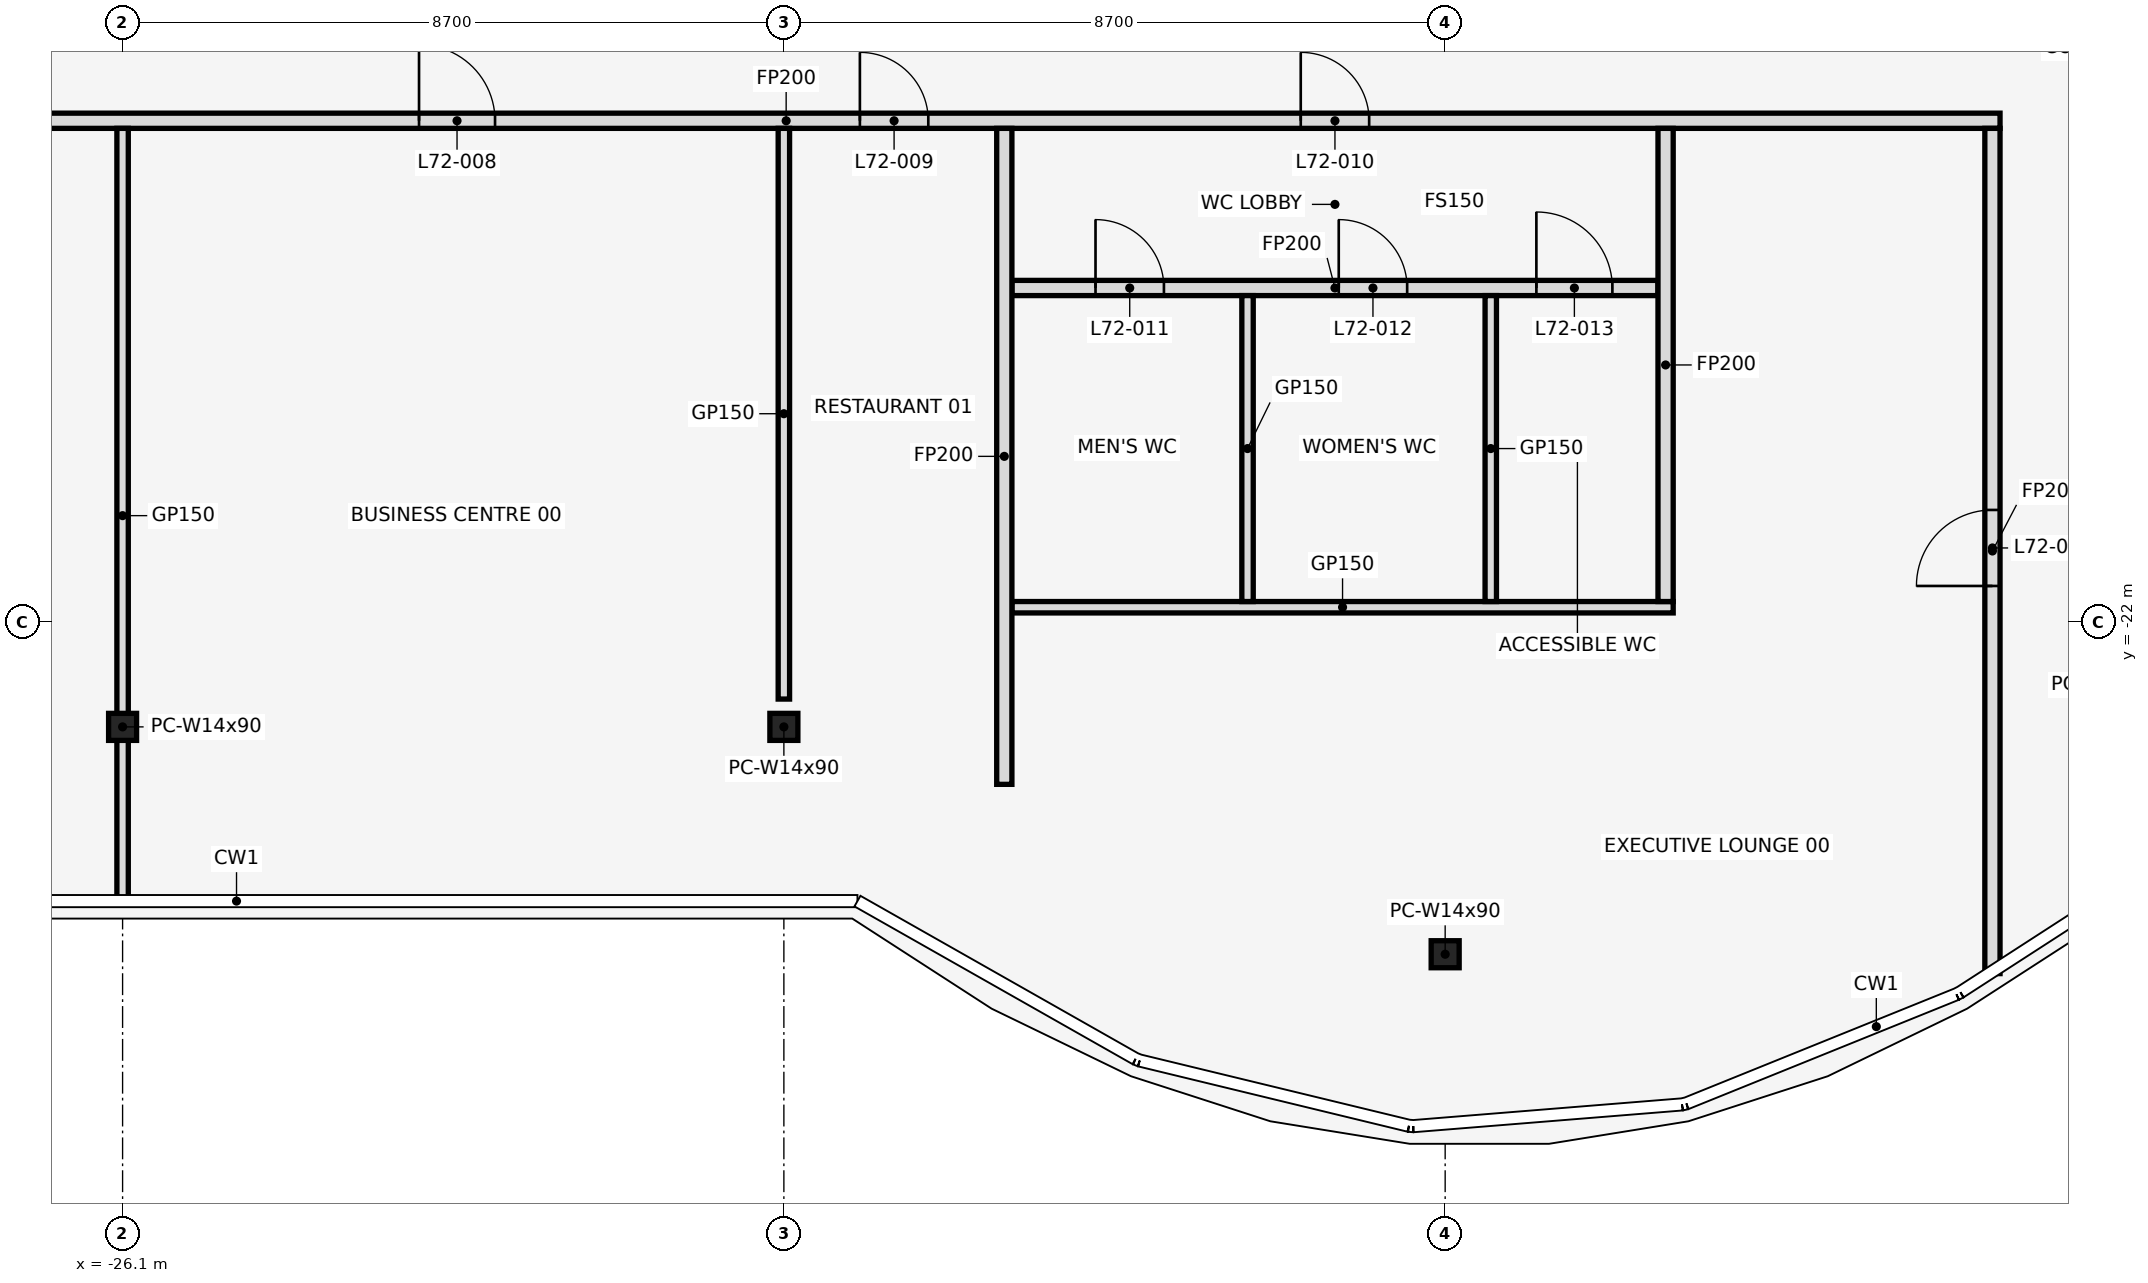
"""IFC4 building model, lengths in metres.
Left out: names, types, materials, properties, quantities, classifications, styles, units other than length and angle.
Written with IfcOpenShell. Run it as: python <this file> out.ifc"""

import sys

from ifc_helpers import new_model, si_unit, direction, frame, frame_2d, origin, origin_2d, place, context, subcontext, project, spatial, rectangle, i_section, extrude, element, fill, save


model = new_model("IFC4")
c1 = context("Model", 3, precision=1e-05, world=origin(), true_north=direction((0.0, 1.0)))
c2 = subcontext(c1, "Body", "Model", "MODEL_VIEW")
j1 = project(units=[si_unit("LENGTHUNIT", "METRE"), si_unit("PLANEANGLEUNIT", "RADIAN")], contexts=[c1])
p1 = place(None, origin())
s1 = spatial("IfcSite", under=j1, at=p1, CompositionType="ELEMENT")
p2 = place(p1, origin())
s2 = spatial("IfcBuilding", under=s1, at=p2, CompositionType="ELEMENT")
p3 = place(p2, frame((0.0, 0.0, 320.0)))
s3 = spatial("IfcBuildingStorey", under=s2, at=p3, CompositionType="ELEMENT", Elevation=320.0)
for number, where, z_axis, x_axis in (
    (1, (-26.1, -23.374, 0.0), (0.0, 0.0, 1.0), (1.0, 0.0, 0.0)),
    (2, (-17.4, -23.374, 0.0), (0.0, 0.0, 1.0), (1.0, 0.0, 0.0)),
    (3, (-8.7, -26.365, 0.0), (0.0, 0.0, 1.0), (1.0, 0.0, 0.0)),
):
    element("IfcColumn", number, at=place(p3, frame(where, z_axis=z_axis, x_axis=x_axis)), inside=s3, PredefinedType="COLUMN", context=c2, shape_type="SweptSolid", body=[
        extrude(i_section(OverallWidth=0.368, OverallDepth=0.356, WebThickness=0.011, FlangeThickness=0.018, at=origin_2d()), origin(), (0.0, 0.0, 1.0), 4.5),
    ])
p4 = place(p3, frame((-14.4, -21.8, 0.0), z_axis=(0.0, 0.0, 1.0), x_axis=(1.0, 0.0, 0.0)))
e4 = element("IfcWall", 4, at=p4, inside=s3, PredefinedType="PARTITIONING", context=c2, shape_type="SweptSolid", body=[
    extrude(rectangle(XDim=8.7, YDim=0.15, at=frame_2d((4.35, 0.0))), origin(), (0.0, 0.0, 1.0), 3.418),
])
p5 = place(p3, frame((-14.4, -17.6, 0.0), z_axis=(0.0, 0.0, 1.0), x_axis=(1.0, 0.0, 0.0)))
e5 = element("IfcWall", 5, at=p5, inside=s3, PredefinedType="PARTITIONING", context=c2, shape_type="SweptSolid", body=[
    extrude(rectangle(XDim=8.5, YDim=0.2, at=frame_2d((4.25, 0.0))), origin(), (0.0, 0.0, 1.0), 3.418),
])
p6 = place(p5, frame((1.1, 0.0, 0.0)))
e6 = element("IfcOpeningElement", 6, at=p6, cuts=e5, PredefinedType="OPENING", context=c2, shape_type="SweptSolid", body=[
    extrude(rectangle(XDim=0.9, YDim=2.1, at=frame_2d((0.45, 1.05))), frame((0.0, 0.112, 0.0), z_axis=(0.0, -1.0, 0.0), x_axis=(1.0, 0.0, 0.0)), (0.0, 0.0, 1.0), 0.224),
])
p7 = place(p5, frame((4.3, 0.0, 0.0)))
e7 = element("IfcOpeningElement", 7, at=p7, cuts=e5, PredefinedType="OPENING", context=c2, shape_type="SweptSolid", body=[
    extrude(rectangle(XDim=0.9, YDim=2.1, at=frame_2d((0.45, 1.05))), frame((0.0, 0.112, 0.0), z_axis=(0.0, -1.0, 0.0), x_axis=(1.0, 0.0, 0.0)), (0.0, 0.0, 1.0), 0.224),
])
p8 = place(p5, frame((6.9, 0.0, 0.0)))
e8 = element("IfcOpeningElement", 8, at=p8, cuts=e5, PredefinedType="OPENING", context=c2, shape_type="SweptSolid", body=[
    extrude(rectangle(XDim=1.0, YDim=2.1, at=frame_2d((0.5, 1.05))), frame((0.0, 0.112, 0.0), z_axis=(0.0, -1.0, 0.0), x_axis=(1.0, 0.0, 0.0)), (0.0, 0.0, 1.0), 0.224),
])
p9 = place(p3, frame((-33.34, -15.4, 0.0), z_axis=(0.0, 0.0, 1.0), x_axis=(1.0, 0.0, 0.0)))
e9 = element("IfcWall", 9, at=p9, inside=s3, PredefinedType="PARTITIONING", context=c2, shape_type="SweptSolid", body=[
    extrude(rectangle(XDim=31.94, YDim=0.2, at=frame_2d((15.97, 0.0))), origin(), (0.0, 0.0, 1.0), 3.418),
])
p10 = place(p9, frame((3.1, 0.0, 0.0)))
e10 = element("IfcOpeningElement", 10, at=p10, cuts=e9, PredefinedType="OPENING", context=c2, shape_type="SweptSolid", body=[
    extrude(rectangle(XDim=1.0, YDim=2.1, at=frame_2d((0.5, 1.05))), frame((0.0, 0.112, 0.0), z_axis=(0.0, -1.0, 0.0), x_axis=(1.0, 0.0, 0.0)), (0.0, 0.0, 1.0), 0.224),
])
p11 = place(p9, frame((11.14, 0.0, 0.0)))
e11 = element("IfcOpeningElement", 11, at=p11, cuts=e9, PredefinedType="OPENING", context=c2, shape_type="SweptSolid", body=[
    extrude(rectangle(XDim=1.0, YDim=2.1, at=frame_2d((0.5, 1.05))), frame((0.0, 0.112, 0.0), z_axis=(0.0, -1.0, 0.0), x_axis=(1.0, 0.0, 0.0)), (0.0, 0.0, 1.0), 0.224),
])
p12 = place(p9, frame((16.94, 0.0, 0.0)))
e12 = element("IfcOpeningElement", 12, at=p12, cuts=e9, PredefinedType="OPENING", context=c2, shape_type="SweptSolid", body=[
    extrude(rectangle(XDim=0.9, YDim=2.1, at=frame_2d((0.45, 1.05))), frame((0.0, 0.112, 0.0), z_axis=(0.0, -1.0, 0.0), x_axis=(1.0, 0.0, 0.0)), (0.0, 0.0, 1.0), 0.224),
])
p13 = place(p9, frame((22.74, 0.0, 0.0)))
e13 = element("IfcOpeningElement", 13, at=p13, cuts=e9, PredefinedType="OPENING", context=c2, shape_type="SweptSolid", body=[
    extrude(rectangle(XDim=0.9, YDim=2.1, at=frame_2d((0.45, 1.05))), frame((0.0, 0.112, 0.0), z_axis=(0.0, -1.0, 0.0), x_axis=(1.0, 0.0, 0.0)), (0.0, 0.0, 1.0), 0.224),
])
p14 = place(p3, frame((-26.1, -25.69, 0.0), z_axis=(0.0, 0.0, 1.0), x_axis=(0.0, 1.0, 0.0)))
e14 = element("IfcWall", 14, at=p14, inside=s3, PredefinedType="PARTITIONING", context=c2, shape_type="SweptSolid", body=[
    extrude(rectangle(XDim=10.19, YDim=0.15, at=frame_2d((5.095, 0.0))), origin(), (0.0, 0.0, 1.0), 3.418),
])
p15 = place(p3, frame((-17.4, -23.008, 0.0), z_axis=(0.0, 0.0, 1.0), x_axis=(0.0, 1.0, 0.0)))
e15 = element("IfcWall", 15, at=p15, inside=s3, PredefinedType="PARTITIONING", context=c2, shape_type="SweptSolid", body=[
    extrude(rectangle(XDim=7.508, YDim=0.15, at=frame_2d((3.754, 0.0))), origin(), (0.0, 0.0, 1.0), 3.418),
])
p16 = place(p3, frame((-14.5, -24.13, 0.0), z_axis=(0.0, 0.0, 1.0), x_axis=(0.0, 1.0, 0.0)))
e16 = element("IfcWall", 16, at=p16, inside=s3, PredefinedType="PARTITIONING", context=c2, shape_type="SweptSolid", body=[
    extrude(rectangle(XDim=8.63, YDim=0.2, at=frame_2d((4.315, 0.0))), origin(), (0.0, 0.0, 1.0), 3.418),
])
for number, where, z_axis, x_axis in (
    (17, (-11.3, -21.725, 0.0), (0.0, 0.0, 1.0), (0.0, 1.0, 0.0)),
    (18, (-8.1, -21.725, 0.0), (0.0, 0.0, 1.0), (0.0, 1.0, 0.0)),
):
    element("IfcWall", number, at=place(p3, frame(where, z_axis=z_axis, x_axis=x_axis)), inside=s3, PredefinedType="PARTITIONING", context=c2, shape_type="SweptSolid", body=[
        extrude(rectangle(XDim=4.025, YDim=0.15, at=frame_2d((2.013, 0.0))), origin(), (0.0, 0.0, 1.0), 3.418),
    ])
p17 = place(p3, frame((-5.8, -21.725, 0.0), z_axis=(0.0, 0.0, 1.0), x_axis=(0.0, 1.0, 0.0)))
e19 = element("IfcWall", 19, at=p17, inside=s3, PredefinedType="PARTITIONING", context=c2, shape_type="SweptSolid", body=[
    extrude(rectangle(XDim=6.225, YDim=0.2, at=frame_2d((3.113, 0.0))), origin(), (0.0, 0.0, 1.0), 3.418),
])
p18 = place(p3, frame((-1.5, -26.62, 0.0), z_axis=(0.0, 0.0, 1.0), x_axis=(0.0, 1.0, 0.0)))
e20 = element("IfcWall", 20, at=p18, inside=s3, PredefinedType="PARTITIONING", context=c2, shape_type="SweptSolid", body=[
    extrude(rectangle(XDim=11.12, YDim=0.2, at=frame_2d((5.56, 0.0))), origin(), (0.0, 0.0, 1.0), 3.418),
])
p19 = place(p18, frame((5.1, 0.0, 0.0)))
e21 = element("IfcOpeningElement", 21, at=p19, cuts=e20, PredefinedType="OPENING", context=c2, shape_type="SweptSolid", body=[
    extrude(rectangle(XDim=1.0, YDim=2.1, at=frame_2d((0.5, 1.05))), frame((0.0, 0.112, 0.0), z_axis=(0.0, -1.0, 0.0), x_axis=(1.0, 0.0, 0.0)), (0.0, 0.0, 1.0), 0.224),
])
p20 = place(p11, frame((1.0, 0.0, 0.0), z_axis=(0.0, 0.0, 1.0), x_axis=(-1.0, 0.0, 0.0)))
e22 = element("IfcDoor", 22, at=p20, inside=s3, OperationType="SINGLE_SWING_RIGHT", PredefinedType="DOOR", context=c2, shape_type="SweptSolid", body=[
    extrude(rectangle(XDim=1.0, YDim=2.1, at=frame_2d((0.5, 1.05))), frame((0.0, 0.025, 0.0), z_axis=(0.0, -1.0, 0.0), x_axis=(1.0, 0.0, 0.0)), (0.0, 0.0, 1.0), 0.05),
])
fill(e11, e22)
p21 = place(p12, frame((0.9, 0.0, 0.0), z_axis=(0.0, 0.0, 1.0), x_axis=(-1.0, 0.0, 0.0)))
e23 = element("IfcDoor", 23, at=p21, inside=s3, OperationType="SINGLE_SWING_RIGHT", PredefinedType="DOOR", context=c2, shape_type="SweptSolid", body=[
    extrude(rectangle(XDim=0.9, YDim=2.1, at=frame_2d((0.45, 1.05))), frame((0.0, 0.025, 0.0), z_axis=(0.0, -1.0, 0.0), x_axis=(1.0, 0.0, 0.0)), (0.0, 0.0, 1.0), 0.05),
])
fill(e12, e23)
p22 = place(p13, frame((0.9, 0.0, 0.0), z_axis=(0.0, 0.0, 1.0), x_axis=(-1.0, 0.0, 0.0)))
e24 = element("IfcDoor", 24, at=p22, inside=s3, OperationType="SINGLE_SWING_LEFT", PredefinedType="DOOR", context=c2, shape_type="SweptSolid", body=[
    extrude(rectangle(XDim=0.9, YDim=2.1, at=frame_2d((0.45, 1.05))), frame((0.0, 0.025, 0.0), z_axis=(0.0, -1.0, 0.0), x_axis=(1.0, 0.0, 0.0)), (0.0, 0.0, 1.0), 0.05),
])
fill(e13, e24)
p23 = place(p6, frame((0.9, 0.0, 0.0), z_axis=(0.0, 0.0, 1.0), x_axis=(-1.0, 0.0, 0.0)))
e25 = element("IfcDoor", 25, at=p23, inside=s3, OperationType="SINGLE_SWING_RIGHT", PredefinedType="DOOR", context=c2, shape_type="SweptSolid", body=[
    extrude(rectangle(XDim=0.9, YDim=2.1, at=frame_2d((0.45, 1.05))), frame((0.0, 0.025, 0.0), z_axis=(0.0, -1.0, 0.0), x_axis=(1.0, 0.0, 0.0)), (0.0, 0.0, 1.0), 0.05),
])
fill(e6, e25)
p24 = place(p7, frame((0.9, 0.0, 0.0), z_axis=(0.0, 0.0, 1.0), x_axis=(-1.0, 0.0, 0.0)))
e26 = element("IfcDoor", 26, at=p24, inside=s3, OperationType="SINGLE_SWING_RIGHT", PredefinedType="DOOR", context=c2, shape_type="SweptSolid", body=[
    extrude(rectangle(XDim=0.9, YDim=2.1, at=frame_2d((0.45, 1.05))), frame((0.0, 0.025, 0.0), z_axis=(0.0, -1.0, 0.0), x_axis=(1.0, 0.0, 0.0)), (0.0, 0.0, 1.0), 0.05),
])
fill(e7, e26)
p25 = place(p8, frame((1.0, 0.0, 0.0), z_axis=(0.0, 0.0, 1.0), x_axis=(-1.0, 0.0, 0.0)))
e27 = element("IfcDoor", 27, at=p25, inside=s3, OperationType="SINGLE_SWING_LEFT", PredefinedType="DOOR", context=c2, shape_type="SweptSolid", body=[
    extrude(rectangle(XDim=1.0, YDim=2.1, at=frame_2d((0.5, 1.05))), frame((0.0, 0.025, 0.0), z_axis=(0.0, -1.0, 0.0), x_axis=(1.0, 0.0, 0.0)), (0.0, 0.0, 1.0), 0.05),
])
fill(e8, e27)
p26 = place(p19, origin())
e28 = element("IfcDoor", 28, at=p26, inside=s3, OperationType="SINGLE_SWING_LEFT", PredefinedType="DOOR", context=c2, shape_type="SweptSolid", body=[
    extrude(rectangle(XDim=1.0, YDim=2.1, at=frame_2d((0.5, 1.05))), frame((0.0, 0.025, 0.0), z_axis=(0.0, -1.0, 0.0), x_axis=(1.0, 0.0, 0.0)), (0.0, 0.0, 1.0), 0.05),
])
fill(e21, e28)
save(model, sys.argv[1])
